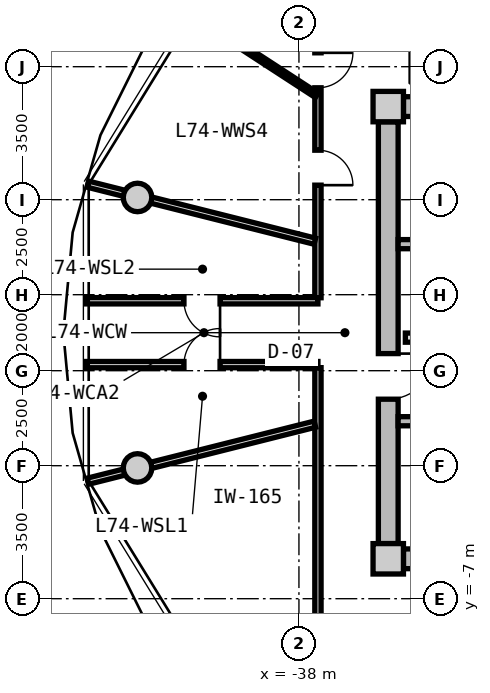
"""IFC4 building model, lengths in metres.
Left out: names, types, materials, properties, quantities, classifications, styles, units other than length and angle.
Written with IfcOpenShell. Run it as: python <this file> out.ifc"""

import sys

from ifc_helpers import new_model, si_unit, direction, frame, frame_2d, origin, origin_2d, place, context, subcontext, project, spatial, rectangle, circle, extrude, source, transform, mapped, element, fill, save


model = new_model("IFC4")
c1 = context("Model", 3, precision=1e-05, world=origin(), true_north=direction((0.0, 1.0)))
c2 = subcontext(c1, "Body", "Model", "MODEL_VIEW")
j1 = project(units=[si_unit("LENGTHUNIT", "METRE"), si_unit("PLANEANGLEUNIT", "RADIAN")], contexts=[c1])
p1 = place(None, origin())
s1 = spatial("IfcSite", under=j1, at=p1, CompositionType="ELEMENT")
p2 = place(p1, origin())
s2 = spatial("IfcBuilding", under=s1, at=p2, CompositionType="ELEMENT")
p3 = place(p2, frame((0.0, 0.0, 238.3)))
s3 = spatial("IfcBuildingStorey", under=s2, at=p3, CompositionType="ELEMENT", Elevation=238.3)
m1 = source(origin(), c2, "Body", "SweptSolid", [
    extrude(rectangle(XDim=0.8, YDim=0.8, at=origin_2d()), origin(), (0.0, 0.0, 1.0), 3.05),
])
for number, where, z_axis, x_axis in (
    (1, (-35.65, -5.95, 0.0), (0.0, 0.0, 1.0), (1.0, 0.0, 0.0)),
    (2, (-35.65, 5.95, 0.0), (0.0, 0.0, 1.0), (1.0, 0.0, 0.0)),
):
    element("IfcColumn", number, at=place(p3, frame(where, z_axis=z_axis, x_axis=x_axis)), inside=s3, PredefinedType="COLUMN", context=c2, shape_type="MappedRepresentation", body=[
        mapped(m1, transform((0.0, 0.0, 0.0), x_axis=(1.0, 0.0, 0.0), y_axis=(0.0, 1.0, 0.0), z_axis=(0.0, 0.0, 1.0), scale=1.0)),
    ])
m2 = source(origin(), c2, "Body", "SweptSolid", [
    extrude(rectangle(XDim=14.5, YDim=0.52, at=frame_2d((7.25, 0.0))), origin(), (0.0, 0.0, 1.0), 2.81),
])
for number, where, z_axis, x_axis in (
    (3, (-35.25, 5.95, 0.0), (0.0, 0.0, 1.0), (1.0, 0.0, 0.0)),
    (4, (-20.75, -5.95, 0.0), (0.0, 0.0, 1.0), (-1.0, 0.0, 0.0)),
):
    element("IfcWall", number, at=place(p3, frame(where, z_axis=z_axis, x_axis=x_axis)), inside=s3, PredefinedType="SHEAR", context=c2, shape_type="MappedRepresentation", body=[
        mapped(m2, transform((0.0, 0.0, 0.0), x_axis=(1.0, 0.0, 0.0), y_axis=(0.0, 1.0, 0.0), z_axis=(0.0, 0.0, 1.0), scale=1.0)),
    ])
m3 = source(origin(), c2, "Body", "SweptSolid", [
    extrude(rectangle(XDim=11.1, YDim=0.52, at=frame_2d((5.55, 0.0))), origin(), (0.0, 0.0, 1.0), 2.81),
])
p4 = place(p3, frame((-35.65, -5.55, 0.0), z_axis=(0.0, 0.0, 1.0), x_axis=(0.0, 1.0, 0.0)))
e5 = element("IfcWall", 5, at=p4, inside=s3, PredefinedType="SHEAR", context=c2, shape_type="MappedRepresentation", body=[
    mapped(m3, transform((0.0, 0.0, 0.0), x_axis=(1.0, 0.0, 0.0), y_axis=(0.0, 1.0, 0.0), z_axis=(0.0, 0.0, 1.0), scale=1.0)),
])
p5 = place(p4, frame((3.8, 0.0, 0.0)))
e6 = element("IfcOpeningElement", 6, at=p5, cuts=e5, PredefinedType="OPENING", context=c2, shape_type="SweptSolid", body=[
    extrude(rectangle(XDim=1.2, YDim=2.15, at=frame_2d((0.6, 1.075))), frame((0.0, 0.27, 0.0), z_axis=(0.0, -1.0, 0.0), x_axis=(1.0, 0.0, 0.0)), (0.0, 0.0, 1.0), 0.54),
])
m4 = source(origin(), c2, "Body", "SweptSolid", [
    extrude(circle(Radius=0.375, at=origin_2d()), origin(), (0.0, 0.0, 1.0), 3.05),
])
for number, where, z_axis, x_axis in (
    (7, (-42.247, 3.559, 0.0), (0.0, 0.0, 1.0), (1.0, 0.0, 0.0)),
    (8, (-42.247, -3.559, 0.0), (0.0, 0.0, 1.0), (1.0, 0.0, 0.0)),
):
    element("IfcColumn", number, at=place(p3, frame(where, z_axis=z_axis, x_axis=x_axis)), inside=s3, PredefinedType="COLUMN", context=c2, shape_type="MappedRepresentation", body=[
        mapped(m4, transform((0.0, 0.0, 0.0), x_axis=(1.0, 0.0, 0.0), y_axis=(0.0, 1.0, 0.0), z_axis=(0.0, 0.0, 1.0), scale=1.0)),
    ])
m5 = source(origin(), c2, "Body", "SweptSolid", [
    extrude(rectangle(XDim=7.93, YDim=0.24, at=frame_2d((3.965, 0.0))), origin(), (0.0, 0.0, 1.0), 2.81),
])
p6 = place(p3, frame((-35.39, 2.33, 0.0), z_axis=(0.0, 0.0, 1.0), x_axis=(1.0, 0.0, 0.0)))
e9 = element("IfcWall", 9, at=p6, inside=s3, PredefinedType="PARTITIONING", context=c2, shape_type="MappedRepresentation", body=[
    mapped(m5, transform((0.0, 0.0, 0.0), x_axis=(1.0, 0.0, 0.0), y_axis=(0.0, 1.0, 0.0), z_axis=(0.0, 0.0, 1.0), scale=1.0)),
])
p7 = place(p3, frame((-35.39, -2.33, 0.0), z_axis=(0.0, 0.0, 1.0), x_axis=(1.0, 0.0, 0.0)))
e10 = element("IfcWall", 10, at=p7, inside=s3, PredefinedType="PARTITIONING", context=c2, shape_type="MappedRepresentation", body=[
    mapped(m5, transform((0.0, 0.0, 0.0), x_axis=(1.0, 0.0, 0.0), y_axis=(0.0, 1.0, 0.0), z_axis=(0.0, 0.0, 1.0), scale=1.0)),
])
p8 = place(p7, frame((1.05, 0.0, 0.0)))
e11 = element("IfcOpeningElement", 11, at=p8, cuts=e10, PredefinedType="OPENING", context=c2, shape_type="SweptSolid", body=[
    extrude(rectangle(XDim=1.1, YDim=2.15, at=frame_2d((0.55, 1.075))), frame((0.0, 0.13, 0.0), z_axis=(0.0, -1.0, 0.0), x_axis=(1.0, 0.0, 0.0)), (0.0, 0.0, 1.0), 0.26),
])
m6 = source(origin(), c2, "Body", "SweptSolid", [
    extrude(rectangle(XDim=7.62, YDim=0.24, at=frame_2d((3.81, 0.0))), origin(), (0.0, 0.0, 1.0), 2.795),
])
p9 = place(p3, frame((-35.2, -0.13, 0.0), z_axis=(0.0, 0.0, 1.0), x_axis=(1.0, 0.0, 0.0)))
e12 = element("IfcWall", 12, at=p9, inside=s3, PredefinedType="PARTITIONING", context=c2, shape_type="MappedRepresentation", body=[
    mapped(m6, transform((0.0, 0.0, 0.0), x_axis=(1.0, 0.0, 0.0), y_axis=(0.0, 1.0, 0.0), z_axis=(0.0, 0.0, 1.0), scale=1.0)),
])
p10 = place(p9, frame((6.22, 0.0, 0.0)))
e13 = element("IfcOpeningElement", 13, at=p10, cuts=e12, PredefinedType="OPENING", context=c2, shape_type="SweptSolid", body=[
    extrude(rectangle(XDim=1.0, YDim=2.1, at=frame_2d((0.5, 1.05))), frame((0.0, 0.13, 0.0), z_axis=(0.0, -1.0, 0.0), x_axis=(1.0, 0.0, 0.0)), (0.0, 0.0, 1.0), 0.26),
])
p11 = place(p9, frame((2.4, 0.0, 0.0)))
e14 = element("IfcOpeningElement", 14, at=p11, cuts=e12, PredefinedType="OPENING", context=c2, shape_type="SweptSolid", body=[
    extrude(rectangle(XDim=1.0, YDim=2.1, at=frame_2d((0.5, 1.05))), frame((0.0, 0.13, 0.0), z_axis=(0.0, -1.0, 0.0), x_axis=(1.0, 0.0, 0.0)), (0.0, 0.0, 1.0), 0.26),
])
m7 = source(origin(), c2, "Body", "SweptSolid", [
    extrude(rectangle(XDim=6.88, YDim=0.165, at=frame_2d((3.44, 0.0))), origin(), (0.0, 0.0, 1.0), 2.795),
])
p12 = place(p3, frame((-37.5, -7.8, 0.0), z_axis=(0.0, 0.0, 1.0), x_axis=(0.0, 1.0, 0.0)))
e15 = element("IfcWall", 15, at=p12, inside=s3, PredefinedType="PARTITIONING", context=c2, shape_type="MappedRepresentation", body=[
    mapped(m7, transform((0.0, 0.0, 0.0), x_axis=(1.0, 0.0, 0.0), y_axis=(0.0, 1.0, 0.0), z_axis=(0.0, 0.0, 1.0), scale=1.0)),
])
p13 = place(p3, frame((-37.5, 0.92, 0.0), z_axis=(0.0, 0.0, 1.0), x_axis=(0.0, 1.0, 0.0)))
e16 = element("IfcWall", 16, at=p13, inside=s3, PredefinedType="PARTITIONING", context=c2, shape_type="MappedRepresentation", body=[
    mapped(m7, transform((0.0, 0.0, 0.0), x_axis=(1.0, 0.0, 0.0), y_axis=(0.0, 1.0, 0.0), z_axis=(0.0, 0.0, 1.0), scale=1.0)),
])
p14 = place(p13, frame((5.525, 0.0, 0.0)))
e17 = element("IfcOpeningElement", 17, at=p14, cuts=e16, PredefinedType="OPENING", context=c2, shape_type="SweptSolid", body=[
    extrude(rectangle(XDim=0.92, YDim=2.1, at=frame_2d((0.46, 1.05))), frame((0.0, 0.093, 0.0), z_axis=(0.0, -1.0, 0.0), x_axis=(1.0, 0.0, 0.0)), (0.0, 0.0, 1.0), 0.185),
])
p15 = place(p13, frame((2.962, 0.0, 0.0)))
e18 = element("IfcOpeningElement", 18, at=p15, cuts=e16, PredefinedType="OPENING", context=c2, shape_type="SweptSolid", body=[
    extrude(rectangle(XDim=0.92, YDim=2.1, at=frame_2d((0.46, 1.05))), frame((0.0, 0.093, 0.0), z_axis=(0.0, -1.0, 0.0), x_axis=(1.0, 0.0, 0.0)), (0.0, 0.0, 1.0), 0.185),
])
m8 = source(origin(), c2, "Body", "SweptSolid", [
    extrude(rectangle(XDim=6.157, YDim=0.165, at=frame_2d((3.079, 0.0))), origin(), (0.0, 0.0, 1.0), 2.395),
])
for number, where, z_axis, x_axis in (
    (19, (-37.58, 2.407, 0.0), (0.0, 0.0, 1.0), (-0.97, 0.244, 0.0)),
    (20, (-37.58, -2.407, 0.0), (0.0, 0.0, 1.0), (-0.97, -0.244, 0.0)),
):
    element("IfcWall", number, at=place(p3, frame(where, z_axis=z_axis, x_axis=x_axis)), inside=s3, PredefinedType="PARTITIONING", context=c2, shape_type="MappedRepresentation", body=[
        mapped(m8, transform((0.0, 0.0, 0.0), x_axis=(1.0, 0.0, 0.0), y_axis=(0.0, 1.0, 0.0), z_axis=(0.0, 0.0, 1.0), scale=1.0)),
    ])
m9 = source(origin(), c2, "Body", "SweptSolid", [
    extrude(rectangle(XDim=6.101, YDim=0.165, at=frame_2d((3.051, 0.0))), origin(), (0.0, 0.0, 1.0), 2.795),
])
p16 = place(p3, frame((-43.601, 0.84, 0.0), z_axis=(0.0, 0.0, 1.0), x_axis=(1.0, 0.0, 0.0)))
e21 = element("IfcWall", 21, at=p16, inside=s3, PredefinedType="PARTITIONING", context=c2, shape_type="MappedRepresentation", body=[
    mapped(m9, transform((0.0, 0.0, 0.0), x_axis=(1.0, 0.0, 0.0), y_axis=(0.0, 1.0, 0.0), z_axis=(0.0, 0.0, 1.0), scale=1.0)),
])
p17 = place(p16, frame((2.576, 0.0, 0.0)))
e22 = element("IfcOpeningElement", 22, at=p17, cuts=e21, PredefinedType="OPENING", context=c2, shape_type="SweptSolid", body=[
    extrude(rectangle(XDim=0.95, YDim=2.1, at=frame_2d((0.475, 1.05))), frame((0.0, 0.093, 0.0), z_axis=(0.0, -1.0, 0.0), x_axis=(1.0, 0.0, 0.0)), (0.0, 0.0, 1.0), 0.185),
])
p18 = place(p3, frame((-37.5, -0.84, 0.0), z_axis=(0.0, 0.0, 1.0), x_axis=(-1.0, 0.0, 0.0)))
e23 = element("IfcWall", 23, at=p18, inside=s3, PredefinedType="PARTITIONING", context=c2, shape_type="MappedRepresentation", body=[
    mapped(m9, transform((0.0, 0.0, 0.0), x_axis=(1.0, 0.0, 0.0), y_axis=(0.0, 1.0, 0.0), z_axis=(0.0, 0.0, 1.0), scale=1.0)),
])
p19 = place(p18, frame((2.576, 0.0, 0.0)))
e24 = element("IfcOpeningElement", 24, at=p19, cuts=e23, PredefinedType="OPENING", context=c2, shape_type="SweptSolid", body=[
    extrude(rectangle(XDim=0.95, YDim=2.1, at=frame_2d((0.475, 1.05))), frame((0.0, 0.093, 0.0), z_axis=(0.0, -1.0, 0.0), x_axis=(1.0, 0.0, 0.0)), (0.0, 0.0, 1.0), 0.185),
])
m10 = source(origin(), c2, "Body", "SweptSolid", [
    extrude(rectangle(XDim=3.904, YDim=0.14, at=frame_2d((1.952, 0.0))), origin(), (0.0, 0.0, 1.0), 2.795),
])
p20 = place(p3, frame((-37.53, 6.246, 0.0), z_axis=(0.0, 0.0, 1.0), x_axis=(-0.838024687996, 0.545632314209, 0.0)))
e25 = element("IfcWall", 25, at=p20, inside=s3, PredefinedType="PARTITIONING", context=c2, shape_type="MappedRepresentation", body=[
    mapped(m10, transform((0.0, 0.0, 0.0), x_axis=(1.0, 0.0, 0.0), y_axis=(0.0, 1.0, 0.0), z_axis=(0.0, 0.0, 1.0), scale=1.0)),
])
m11 = source(origin(), c2, "Body", "SweptSolid", [
    extrude(rectangle(XDim=1.2, YDim=2.15, at=frame_2d((0.6, 1.075))), frame((0.0, 0.025, 0.0), z_axis=(0.0, -1.0, 0.0), x_axis=(1.0, 0.0, 0.0)), (0.0, 0.0, 1.0), 0.05),
])
p21 = place(p5, frame((1.2, 0.0, 0.0), z_axis=(0.0, 0.0, 1.0), x_axis=(-1.0, 0.0, 0.0)))
e26 = element("IfcDoor", 26, at=p21, inside=s3, OperationType="SINGLE_SWING_LEFT", PredefinedType="DOOR", context=c2, shape_type="MappedRepresentation", body=[
    mapped(m11, transform((0.0, 0.0, 0.0), x_axis=(1.0, 0.0, 0.0), y_axis=(0.0, 1.0, 0.0), z_axis=(0.0, 0.0, 1.0), scale=1.0)),
])
fill(e6, e26)
m12 = source(origin(), c2, "Body", "SweptSolid", [
    extrude(rectangle(XDim=0.95, YDim=2.1, at=frame_2d((0.475, 1.05))), frame((0.0, 0.025, 0.0), z_axis=(0.0, -1.0, 0.0), x_axis=(1.0, 0.0, 0.0)), (0.0, 0.0, 1.0), 0.05),
])
p22 = place(p19, frame((0.95, 0.0, 0.0), z_axis=(0.0, 0.0, 1.0), x_axis=(-1.0, 0.0, 0.0)))
e27 = element("IfcDoor", 27, at=p22, inside=s3, OperationType="SINGLE_SWING_RIGHT", PredefinedType="DOOR", context=c2, shape_type="MappedRepresentation", body=[
    mapped(m12, transform((0.0, 0.0, 0.0), x_axis=(1.0, 0.0, 0.0), y_axis=(0.0, 1.0, 0.0), z_axis=(0.0, 0.0, 1.0), scale=1.0)),
])
fill(e24, e27)
p23 = place(p17, frame((0.95, 0.0, 0.0), z_axis=(0.0, 0.0, 1.0), x_axis=(-1.0, 0.0, 0.0)))
e28 = element("IfcDoor", 28, at=p23, inside=s3, OperationType="SINGLE_SWING_LEFT", PredefinedType="DOOR", context=c2, shape_type="MappedRepresentation", body=[
    mapped(m12, transform((0.0, 0.0, 0.0), x_axis=(1.0, 0.0, 0.0), y_axis=(0.0, 1.0, 0.0), z_axis=(0.0, 0.0, 1.0), scale=1.0)),
])
fill(e22, e28)
m13 = source(origin(), c2, "Body", "SweptSolid", [
    extrude(rectangle(XDim=0.92, YDim=2.1, at=frame_2d((0.46, 1.05))), frame((0.0, 0.025, 0.0), z_axis=(0.0, -1.0, 0.0), x_axis=(1.0, 0.0, 0.0)), (0.0, 0.0, 1.0), 0.05),
])
p24 = place(p14, frame((0.92, 0.0, 0.0), z_axis=(0.0, 0.0, 1.0), x_axis=(-1.0, 0.0, 0.0)))
e29 = element("IfcDoor", 29, at=p24, inside=s3, OperationType="SINGLE_SWING_LEFT", PredefinedType="DOOR", context=c2, shape_type="MappedRepresentation", body=[
    mapped(m13, transform((0.0, 0.0, 0.0), x_axis=(1.0, 0.0, 0.0), y_axis=(0.0, 1.0, 0.0), z_axis=(0.0, 0.0, 1.0), scale=1.0)),
])
fill(e17, e29)
p25 = place(p15, frame((0.92, 0.0, 0.0), z_axis=(0.0, 0.0, 1.0), x_axis=(-1.0, 0.0, 0.0)))
e30 = element("IfcDoor", 30, at=p25, inside=s3, OperationType="SINGLE_SWING_RIGHT", PredefinedType="DOOR", context=c2, shape_type="MappedRepresentation", body=[
    mapped(m13, transform((0.0, 0.0, 0.0), x_axis=(1.0, 0.0, 0.0), y_axis=(0.0, 1.0, 0.0), z_axis=(0.0, 0.0, 1.0), scale=1.0)),
])
fill(e18, e30)
save(model, sys.argv[1])
